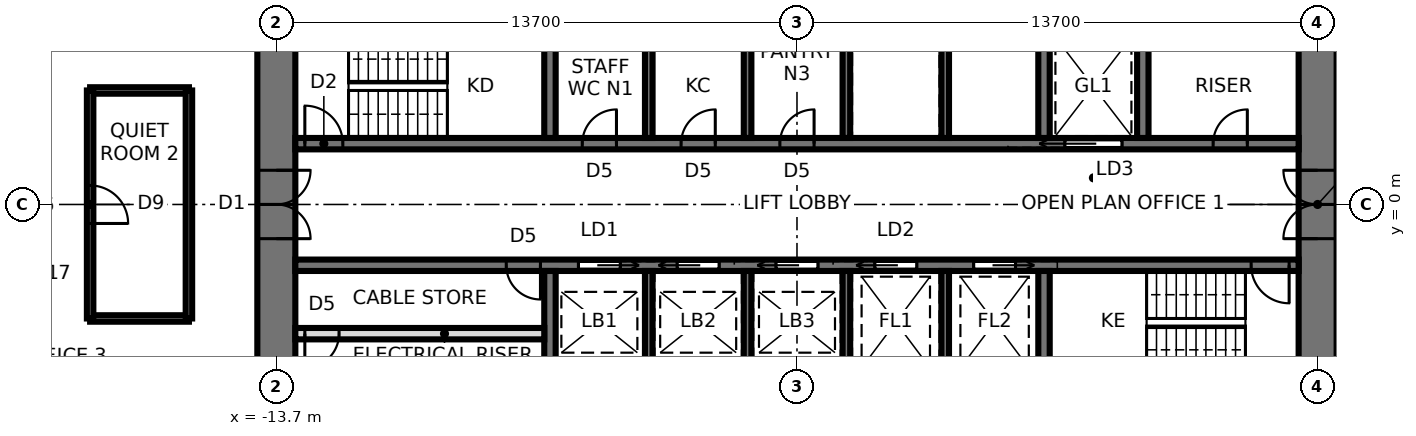
"""IFC4 building model, lengths in metres.
Left out: names, types, materials, properties, quantities, classifications, styles, units other than length and angle.
Written with IfcOpenShell. Run it as: python <this file> out.ifc"""

import sys

from ifc_helpers import new_model, si_unit, direction, frame, frame_2d, origin, place, context, subcontext, project, spatial, rectangle, extrude, element, fill, save


model = new_model("IFC4")
c1 = context("Model", 3, precision=1e-05, world=origin(), true_north=direction((0.0, 1.0)))
c2 = subcontext(c1, "Body", "Model", "MODEL_VIEW")
j1 = project(units=[si_unit("LENGTHUNIT", "METRE"), si_unit("PLANEANGLEUNIT", "RADIAN")], contexts=[c1])
p1 = place(None, origin())
s1 = spatial("IfcSite", under=j1, at=p1, CompositionType="ELEMENT")
p2 = place(p1, origin())
s2 = spatial("IfcBuilding", under=s1, at=p2, CompositionType="ELEMENT")
p3 = place(p2, frame((0.0, 0.0, 127.5)))
s3 = spatial("IfcBuildingStorey", under=s2, at=p3, CompositionType="ELEMENT", Elevation=127.5)
p4 = place(p3, frame((13.7, -9.5, 0.0), z_axis=(0.0, 0.0, 1.0), x_axis=(0.0, 1.0, 0.0)))
e1 = element("IfcWall", 1, at=p4, inside=s3, PredefinedType="SHEAR", context=c2, shape_type="SweptSolid", body=[
    extrude(rectangle(XDim=19.0, YDim=1.0, at=frame_2d((9.5, 0.0))), origin(), (0.0, 0.0, 1.0), 3.9),
])
p5 = place(p4, frame((8.6, 0.0, 0.0)))
e2 = element("IfcOpeningElement", 2, at=p5, cuts=e1, PredefinedType="OPENING", context=c2, shape_type="SweptSolid", body=[
    extrude(rectangle(XDim=1.8, YDim=2.4, at=frame_2d((0.9, 1.2))), frame((0.0, 0.51, 0.0), z_axis=(0.0, -1.0, 0.0), x_axis=(1.0, 0.0, 0.0)), (0.0, 0.0, 1.0), 1.02),
])
p6 = place(p3, frame((-13.7, 9.5, 0.0), z_axis=(0.0, 0.0, 1.0), x_axis=(0.0, -1.0, 0.0)))
e3 = element("IfcWall", 3, at=p6, inside=s3, PredefinedType="SHEAR", context=c2, shape_type="SweptSolid", body=[
    extrude(rectangle(XDim=19.0, YDim=1.0, at=frame_2d((9.5, 0.0))), origin(), (0.0, 0.0, 1.0), 3.9),
])
p7 = place(p6, frame((8.6, 0.0, 0.0)))
e4 = element("IfcOpeningElement", 4, at=p7, cuts=e3, PredefinedType="OPENING", context=c2, shape_type="SweptSolid", body=[
    extrude(rectangle(XDim=1.8, YDim=2.4, at=frame_2d((0.9, 1.2))), frame((0.0, 0.51, 0.0), z_axis=(0.0, -1.0, 0.0), x_axis=(1.0, 0.0, 0.0)), (0.0, 0.0, 1.0), 1.02),
])
p8 = place(p3, frame((-13.2, 1.6, 0.0), z_axis=(0.0, 0.0, 1.0), x_axis=(1.0, 0.0, 0.0)))
e5 = element("IfcWall", 5, at=p8, inside=s3, PredefinedType="SHEAR", context=c2, shape_type="SweptSolid", body=[
    extrude(rectangle(XDim=26.4, YDim=0.3, at=frame_2d((13.2, 0.0))), origin(), (0.0, 0.0, 1.0), 3.9),
])
p9 = place(p8, frame((0.25, 0.0, 0.0)))
e6 = element("IfcOpeningElement", 6, at=p9, cuts=e5, PredefinedType="OPENING", context=c2, shape_type="SweptSolid", body=[
    extrude(rectangle(XDim=1.0, YDim=2.1, at=frame_2d((0.5, 1.05))), frame((0.0, 0.16, 0.0), z_axis=(0.0, -1.0, 0.0), x_axis=(1.0, 0.0, 0.0)), (0.0, 0.0, 1.0), 0.32),
])
p10 = place(p8, frame((20.25, 0.0, 0.0)))
e7 = element("IfcOpeningElement", 7, at=p10, cuts=e5, PredefinedType="OPENING", context=c2, shape_type="SweptSolid", body=[
    extrude(rectangle(XDim=1.5, YDim=2.4, at=frame_2d((0.75, 1.2))), frame((0.0, 0.16, 0.0), z_axis=(0.0, -1.0, 0.0), x_axis=(1.0, 0.0, 0.0)), (0.0, 0.0, 1.0), 0.32),
])
p11 = place(p8, frame((7.55, 0.0, 0.0)))
e8 = element("IfcOpeningElement", 8, at=p11, cuts=e5, PredefinedType="OPENING", context=c2, shape_type="SweptSolid", body=[
    extrude(rectangle(XDim=0.9, YDim=2.1, at=frame_2d((0.45, 1.05))), frame((0.0, 0.16, 0.0), z_axis=(0.0, -1.0, 0.0), x_axis=(1.0, 0.0, 0.0)), (0.0, 0.0, 1.0), 0.32),
])
p12 = place(p8, frame((10.15, 0.0, 0.0)))
e9 = element("IfcOpeningElement", 9, at=p12, cuts=e5, PredefinedType="OPENING", context=c2, shape_type="SweptSolid", body=[
    extrude(rectangle(XDim=0.9, YDim=2.1, at=frame_2d((0.45, 1.05))), frame((0.0, 0.16, 0.0), z_axis=(0.0, -1.0, 0.0), x_axis=(1.0, 0.0, 0.0)), (0.0, 0.0, 1.0), 0.32),
])
p13 = place(p8, frame((12.75, 0.0, 0.0)))
e10 = element("IfcOpeningElement", 10, at=p13, cuts=e5, PredefinedType="OPENING", context=c2, shape_type="SweptSolid", body=[
    extrude(rectangle(XDim=0.9, YDim=2.1, at=frame_2d((0.45, 1.05))), frame((0.0, 0.16, 0.0), z_axis=(0.0, -1.0, 0.0), x_axis=(1.0, 0.0, 0.0)), (0.0, 0.0, 1.0), 0.32),
])
p14 = place(p8, frame((24.15, 0.0, 0.0)))
e11 = element("IfcOpeningElement", 11, at=p14, cuts=e5, PredefinedType="OPENING", context=c2, shape_type="SweptSolid", body=[
    extrude(rectangle(XDim=0.9, YDim=2.1, at=frame_2d((0.45, 1.05))), frame((0.0, 0.16, 0.0), z_axis=(0.0, -1.0, 0.0), x_axis=(1.0, 0.0, 0.0)), (0.0, 0.0, 1.0), 0.32),
])
p15 = place(p3, frame((-13.2, -1.6, 0.0), z_axis=(0.0, 0.0, 1.0), x_axis=(1.0, 0.0, 0.0)))
e12 = element("IfcWall", 12, at=p15, inside=s3, PredefinedType="SHEAR", context=c2, shape_type="SweptSolid", body=[
    extrude(rectangle(XDim=26.4, YDim=0.3, at=frame_2d((13.2, 0.0))), origin(), (0.0, 0.0, 1.0), 3.9),
])
p16 = place(p15, frame((25.15, 0.0, 0.0)))
e13 = element("IfcOpeningElement", 13, at=p16, cuts=e12, PredefinedType="OPENING", context=c2, shape_type="SweptSolid", body=[
    extrude(rectangle(XDim=1.0, YDim=2.1, at=frame_2d((0.5, 1.05))), frame((0.0, 0.16, 0.0), z_axis=(0.0, -1.0, 0.0), x_axis=(1.0, 0.0, 0.0)), (0.0, 0.0, 1.0), 0.32),
])
p17 = place(p15, frame((7.45, 0.0, 0.0)))
e14 = element("IfcOpeningElement", 14, at=p17, cuts=e12, PredefinedType="OPENING", context=c2, shape_type="SweptSolid", body=[
    extrude(rectangle(XDim=1.1, YDim=2.3, at=frame_2d((0.55, 1.15))), frame((0.0, 0.16, 0.0), z_axis=(0.0, -1.0, 0.0), x_axis=(1.0, 0.0, 0.0)), (0.0, 0.0, 1.0), 0.32),
])
p18 = place(p15, frame((10.05, 0.0, 0.0)))
e15 = element("IfcOpeningElement", 15, at=p18, cuts=e12, PredefinedType="OPENING", context=c2, shape_type="SweptSolid", body=[
    extrude(rectangle(XDim=1.1, YDim=2.3, at=frame_2d((0.55, 1.15))), frame((0.0, 0.16, 0.0), z_axis=(0.0, -1.0, 0.0), x_axis=(1.0, 0.0, 0.0)), (0.0, 0.0, 1.0), 0.32),
])
p19 = place(p15, frame((12.65, 0.0, 0.0)))
e16 = element("IfcOpeningElement", 16, at=p19, cuts=e12, PredefinedType="OPENING", context=c2, shape_type="SweptSolid", body=[
    extrude(rectangle(XDim=1.1, YDim=2.3, at=frame_2d((0.55, 1.15))), frame((0.0, 0.16, 0.0), z_axis=(0.0, -1.0, 0.0), x_axis=(1.0, 0.0, 0.0)), (0.0, 0.0, 1.0), 0.32),
])
p20 = place(p15, frame((15.25, 0.0, 0.0)))
e17 = element("IfcOpeningElement", 17, at=p20, cuts=e12, PredefinedType="OPENING", context=c2, shape_type="SweptSolid", body=[
    extrude(rectangle(XDim=1.1, YDim=2.3, at=frame_2d((0.55, 1.15))), frame((0.0, 0.16, 0.0), z_axis=(0.0, -1.0, 0.0), x_axis=(1.0, 0.0, 0.0)), (0.0, 0.0, 1.0), 0.32),
])
p21 = place(p15, frame((17.85, 0.0, 0.0)))
e18 = element("IfcOpeningElement", 18, at=p21, cuts=e12, PredefinedType="OPENING", context=c2, shape_type="SweptSolid", body=[
    extrude(rectangle(XDim=1.1, YDim=2.3, at=frame_2d((0.55, 1.15))), frame((0.0, 0.16, 0.0), z_axis=(0.0, -1.0, 0.0), x_axis=(1.0, 0.0, 0.0)), (0.0, 0.0, 1.0), 0.32),
])
p22 = place(p15, frame((5.55, 0.0, 0.0)))
e19 = element("IfcOpeningElement", 19, at=p22, cuts=e12, PredefinedType="OPENING", context=c2, shape_type="SweptSolid", body=[
    extrude(rectangle(XDim=0.9, YDim=2.1, at=frame_2d((0.45, 1.05))), frame((0.0, 0.16, 0.0), z_axis=(0.0, -1.0, 0.0), x_axis=(1.0, 0.0, 0.0)), (0.0, 0.0, 1.0), 0.32),
])
for number, where, z_axis, x_axis in (
    (20, (-6.5, 1.75, 0.0), (0.0, 0.0, 1.0), (0.0, 1.0, 0.0)),
    (21, (6.5, 1.75, 0.0), (0.0, 0.0, 1.0), (0.0, 1.0, 0.0)),
):
    element("IfcWall", number, at=place(p3, frame(where, z_axis=z_axis, x_axis=x_axis)), inside=s3, PredefinedType="SHEAR", context=c2, shape_type="SweptSolid", body=[
        extrude(rectangle(XDim=2.7, YDim=0.3, at=frame_2d((1.35, 0.0))), origin(), (0.0, 0.0, 1.0), 3.9),
    ])
for number, where, z_axis, x_axis in (
    (22, (-3.9, 1.75, 0.0), (0.0, 0.0, 1.0), (0.0, 1.0, 0.0)),
    (23, (-1.3, 1.75, 0.0), (0.0, 0.0, 1.0), (0.0, 1.0, 0.0)),
    (24, (1.3, 1.75, 0.0), (0.0, 0.0, 1.0), (0.0, 1.0, 0.0)),
    (25, (3.9, 1.75, 0.0), (0.0, 0.0, 1.0), (0.0, 1.0, 0.0)),
):
    element("IfcWall", number, at=place(p3, frame(where, z_axis=z_axis, x_axis=x_axis)), inside=s3, PredefinedType="SHEAR", context=c2, shape_type="SweptSolid", body=[
        extrude(rectangle(XDim=2.7, YDim=0.2, at=frame_2d((1.35, 0.0))), origin(), (0.0, 0.0, 1.0), 3.9),
    ])
for number, where, z_axis, x_axis in (
    (26, (-6.5, -1.75, 0.0), (0.0, 0.0, 1.0), (0.0, -1.0, 0.0)),
    (27, (6.5, -1.75, 0.0), (0.0, 0.0, 1.0), (0.0, -1.0, 0.0)),
):
    element("IfcWall", number, at=place(p3, frame(where, z_axis=z_axis, x_axis=x_axis)), inside=s3, PredefinedType="SHEAR", context=c2, shape_type="SweptSolid", body=[
        extrude(rectangle(XDim=2.7, YDim=0.3, at=frame_2d((1.35, 0.0))), origin(), (0.0, 0.0, 1.0), 3.9),
    ])
for number, where, z_axis, x_axis in (
    (28, (-3.9, -1.75, 0.0), (0.0, 0.0, 1.0), (0.0, -1.0, 0.0)),
    (29, (-1.3, -1.75, 0.0), (0.0, 0.0, 1.0), (0.0, -1.0, 0.0)),
    (30, (1.3, -1.75, 0.0), (0.0, 0.0, 1.0), (0.0, -1.0, 0.0)),
    (31, (3.9, -1.75, 0.0), (0.0, 0.0, 1.0), (0.0, -1.0, 0.0)),
):
    element("IfcWall", number, at=place(p3, frame(where, z_axis=z_axis, x_axis=x_axis)), inside=s3, PredefinedType="SHEAR", context=c2, shape_type="SweptSolid", body=[
        extrude(rectangle(XDim=2.7, YDim=0.2, at=frame_2d((1.35, 0.0))), origin(), (0.0, 0.0, 1.0), 3.9),
    ])
p23 = place(p3, frame((9.1, 1.75, 0.0), z_axis=(0.0, 0.0, 1.0), x_axis=(0.0, 1.0, 0.0)))
e32 = element("IfcWall", 32, at=p23, inside=s3, PredefinedType="SHEAR", context=c2, shape_type="SweptSolid", body=[
    extrude(rectangle(XDim=2.7, YDim=0.3, at=frame_2d((1.35, 0.0))), origin(), (0.0, 0.0, 1.0), 3.9),
])
p24 = place(p3, frame((-13.2, -3.4, 0.0), z_axis=(0.0, 0.0, 1.0), x_axis=(1.0, 0.0, 0.0)))
e33 = element("IfcWall", 33, at=p24, inside=s3, PredefinedType="SOLIDWALL", context=c2, shape_type="SweptSolid", body=[
    extrude(rectangle(XDim=6.55, YDim=0.3, at=frame_2d((3.275, 0.0))), origin(), (0.0, 0.0, 1.0), 3.74),
])
p25 = place(p24, frame((0.25, 0.0, 0.0)))
e34 = element("IfcOpeningElement", 34, at=p25, cuts=e33, PredefinedType="OPENING", context=c2, shape_type="SweptSolid", body=[
    extrude(rectangle(XDim=0.9, YDim=2.1, at=frame_2d((0.45, 1.05))), frame((0.0, 0.16, 0.0), z_axis=(0.0, -1.0, 0.0), x_axis=(1.0, 0.0, 0.0)), (0.0, 0.0, 1.0), 0.32),
])
for number, where, z_axis, x_axis in (
    (35, (-16.0, -3.0, 0.0), (0.0, 0.0, 1.0), (-1.0, 0.0, 0.0)),
    (36, (-18.6, 3.0, 0.0), (0.0, 0.0, 1.0), (1.0, 0.0, 0.0)),
):
    element("IfcWall", number, at=place(p3, frame(where, z_axis=z_axis, x_axis=x_axis)), inside=s3, PredefinedType="PARTITIONING", context=c2, shape_type="SweptSolid", body=[
        extrude(rectangle(XDim=2.6, YDim=0.17, at=frame_2d((1.3, 0.0))), origin(), (0.0, 0.0, 1.0), 3.74),
    ])
p26 = place(p3, frame((-18.6, -3.0, 0.0), z_axis=(0.0, 0.0, 1.0), x_axis=(0.0, 1.0, 0.0)))
e37 = element("IfcWall", 37, at=p26, inside=s3, PredefinedType="PARTITIONING", context=c2, shape_type="SweptSolid", body=[
    extrude(rectangle(XDim=6.0, YDim=0.17, at=frame_2d((3.0, 0.0))), origin(), (0.0, 0.0, 1.0), 3.74),
])
p27 = place(p26, frame((2.5, 0.0, 0.0)))
e38 = element("IfcOpeningElement", 38, at=p27, cuts=e37, PredefinedType="OPENING", context=c2, shape_type="SweptSolid", body=[
    extrude(rectangle(XDim=1.0, YDim=2.4, at=frame_2d((0.5, 1.2))), frame((0.0, 0.095, 0.0), z_axis=(0.0, -1.0, 0.0), x_axis=(1.0, 0.0, 0.0)), (0.0, 0.0, 1.0), 0.19),
])
p28 = place(p3, frame((-16.0, 3.0, 0.0), z_axis=(0.0, 0.0, 1.0), x_axis=(0.0, -1.0, 0.0)))
e39 = element("IfcWall", 39, at=p28, inside=s3, PredefinedType="PARTITIONING", context=c2, shape_type="SweptSolid", body=[
    extrude(rectangle(XDim=6.0, YDim=0.17, at=frame_2d((3.0, 0.0))), origin(), (0.0, 0.0, 1.0), 3.74),
])
p29 = place(p7, origin())
e40 = element("IfcDoor", 40, at=p29, inside=s3, OperationType="DOUBLE_DOOR_SINGLE_SWING", PredefinedType="DOOR", context=c2, shape_type="SweptSolid", body=[
    extrude(rectangle(XDim=1.72, YDim=2.36, at=frame_2d((0.9, 1.18))), frame((0.0, 0.025, 0.0), z_axis=(0.0, -1.0, 0.0), x_axis=(1.0, 0.0, 0.0)), (0.0, 0.0, 1.0), 0.05),
    extrude(rectangle(XDim=0.04, YDim=2.4, at=frame_2d((0.02, 1.2))), frame((0.0, 0.25, 0.0), z_axis=(0.0, -1.0, 0.0), x_axis=(1.0, 0.0, 0.0)), (0.0, 0.0, 1.0), 0.5),
    extrude(rectangle(XDim=0.04, YDim=2.4, at=frame_2d((1.78, 1.2))), frame((0.0, 0.25, 0.0), z_axis=(0.0, -1.0, 0.0), x_axis=(1.0, 0.0, 0.0)), (0.0, 0.0, 1.0), 0.5),
    extrude(rectangle(XDim=1.72, YDim=0.04, at=frame_2d((0.9, 2.38))), frame((0.0, 0.25, 0.0), z_axis=(0.0, -1.0, 0.0), x_axis=(1.0, 0.0, 0.0)), (0.0, 0.0, 1.0), 0.5),
])
fill(e4, e40)
p30 = place(p5, origin())
e41 = element("IfcDoor", 41, at=p30, inside=s3, OperationType="DOUBLE_DOOR_SINGLE_SWING", PredefinedType="DOOR", context=c2, shape_type="SweptSolid", body=[
    extrude(rectangle(XDim=1.72, YDim=2.36, at=frame_2d((0.9, 1.18))), frame((0.0, 0.025, 0.0), z_axis=(0.0, -1.0, 0.0), x_axis=(1.0, 0.0, 0.0)), (0.0, 0.0, 1.0), 0.05),
    extrude(rectangle(XDim=0.04, YDim=2.4, at=frame_2d((0.02, 1.2))), frame((0.0, 0.25, 0.0), z_axis=(0.0, -1.0, 0.0), x_axis=(1.0, 0.0, 0.0)), (0.0, 0.0, 1.0), 0.5),
    extrude(rectangle(XDim=0.04, YDim=2.4, at=frame_2d((1.78, 1.2))), frame((0.0, 0.25, 0.0), z_axis=(0.0, -1.0, 0.0), x_axis=(1.0, 0.0, 0.0)), (0.0, 0.0, 1.0), 0.5),
    extrude(rectangle(XDim=1.72, YDim=0.04, at=frame_2d((0.9, 2.38))), frame((0.0, 0.25, 0.0), z_axis=(0.0, -1.0, 0.0), x_axis=(1.0, 0.0, 0.0)), (0.0, 0.0, 1.0), 0.5),
])
fill(e2, e41)
p31 = place(p9, origin())
e42 = element("IfcDoor", 42, at=p31, inside=s3, OperationType="SINGLE_SWING_LEFT", PredefinedType="DOOR", context=c2, shape_type="SweptSolid", body=[
    extrude(rectangle(XDim=1.0, YDim=2.1, at=frame_2d((0.5, 1.05))), frame((0.0, 0.025, 0.0), z_axis=(0.0, -1.0, 0.0), x_axis=(1.0, 0.0, 0.0)), (0.0, 0.0, 1.0), 0.05),
])
fill(e6, e42)
p32 = place(p16, frame((1.0, 0.0, 0.0), z_axis=(0.0, 0.0, 1.0), x_axis=(-1.0, 0.0, 0.0)))
e43 = element("IfcDoor", 43, at=p32, inside=s3, OperationType="SINGLE_SWING_LEFT", PredefinedType="DOOR", context=c2, shape_type="SweptSolid", body=[
    extrude(rectangle(XDim=1.0, YDim=2.1, at=frame_2d((0.5, 1.05))), frame((0.0, 0.025, 0.0), z_axis=(0.0, -1.0, 0.0), x_axis=(1.0, 0.0, 0.0)), (0.0, 0.0, 1.0), 0.05),
])
fill(e13, e43)
p33 = place(p10, origin())
e44 = element("IfcDoor", 44, at=p33, inside=s3, OperationType="SLIDING_TO_LEFT", PredefinedType="DOOR", context=c2, shape_type="SweptSolid", body=[
    extrude(rectangle(XDim=1.5, YDim=2.4, at=frame_2d((0.75, 1.2))), frame((0.0, 0.025, 0.0), z_axis=(0.0, -1.0, 0.0), x_axis=(1.0, 0.0, 0.0)), (0.0, 0.0, 1.0), 0.05),
])
fill(e7, e44)
p34 = place(p11, origin())
e45 = element("IfcDoor", 45, at=p34, inside=s3, OperationType="SINGLE_SWING_RIGHT", PredefinedType="DOOR", context=c2, shape_type="SweptSolid", body=[
    extrude(rectangle(XDim=0.9, YDim=2.1, at=frame_2d((0.45, 1.05))), frame((0.0, 0.025, 0.0), z_axis=(0.0, -1.0, 0.0), x_axis=(1.0, 0.0, 0.0)), (0.0, 0.0, 1.0), 0.05),
])
fill(e8, e45)
p35 = place(p12, origin())
e46 = element("IfcDoor", 46, at=p35, inside=s3, OperationType="SINGLE_SWING_RIGHT", PredefinedType="DOOR", context=c2, shape_type="SweptSolid", body=[
    extrude(rectangle(XDim=0.9, YDim=2.1, at=frame_2d((0.45, 1.05))), frame((0.0, 0.025, 0.0), z_axis=(0.0, -1.0, 0.0), x_axis=(1.0, 0.0, 0.0)), (0.0, 0.0, 1.0), 0.05),
])
fill(e9, e46)
p36 = place(p13, origin())
e47 = element("IfcDoor", 47, at=p36, inside=s3, OperationType="SINGLE_SWING_RIGHT", PredefinedType="DOOR", context=c2, shape_type="SweptSolid", body=[
    extrude(rectangle(XDim=0.9, YDim=2.1, at=frame_2d((0.45, 1.05))), frame((0.0, 0.025, 0.0), z_axis=(0.0, -1.0, 0.0), x_axis=(1.0, 0.0, 0.0)), (0.0, 0.0, 1.0), 0.05),
])
fill(e10, e47)
p37 = place(p17, frame((1.1, 0.0, 0.0), z_axis=(0.0, 0.0, 1.0), x_axis=(-1.0, 0.0, 0.0)))
e48 = element("IfcDoor", 48, at=p37, inside=s3, OperationType="SLIDING_TO_LEFT", PredefinedType="DOOR", context=c2, shape_type="SweptSolid", body=[
    extrude(rectangle(XDim=1.1, YDim=2.3, at=frame_2d((0.55, 1.15))), frame((0.0, 0.025, 0.0), z_axis=(0.0, -1.0, 0.0), x_axis=(1.0, 0.0, 0.0)), (0.0, 0.0, 1.0), 0.05),
])
fill(e14, e48)
p38 = place(p18, frame((1.1, 0.0, 0.0), z_axis=(0.0, 0.0, 1.0), x_axis=(-1.0, 0.0, 0.0)))
e49 = element("IfcDoor", 49, at=p38, inside=s3, OperationType="SLIDING_TO_RIGHT", PredefinedType="DOOR", context=c2, shape_type="SweptSolid", body=[
    extrude(rectangle(XDim=1.1, YDim=2.3, at=frame_2d((0.55, 1.15))), frame((0.0, 0.025, 0.0), z_axis=(0.0, -1.0, 0.0), x_axis=(1.0, 0.0, 0.0)), (0.0, 0.0, 1.0), 0.05),
])
fill(e15, e49)
p39 = place(p19, frame((1.1, 0.0, 0.0), z_axis=(0.0, 0.0, 1.0), x_axis=(-1.0, 0.0, 0.0)))
e50 = element("IfcDoor", 50, at=p39, inside=s3, OperationType="SLIDING_TO_RIGHT", PredefinedType="DOOR", context=c2, shape_type="SweptSolid", body=[
    extrude(rectangle(XDim=1.1, YDim=2.3, at=frame_2d((0.55, 1.15))), frame((0.0, 0.025, 0.0), z_axis=(0.0, -1.0, 0.0), x_axis=(1.0, 0.0, 0.0)), (0.0, 0.0, 1.0), 0.05),
])
fill(e16, e50)
p40 = place(p20, frame((1.1, 0.0, 0.0), z_axis=(0.0, 0.0, 1.0), x_axis=(-1.0, 0.0, 0.0)))
e51 = element("IfcDoor", 51, at=p40, inside=s3, OperationType="SLIDING_TO_RIGHT", PredefinedType="DOOR", context=c2, shape_type="SweptSolid", body=[
    extrude(rectangle(XDim=1.1, YDim=2.3, at=frame_2d((0.55, 1.15))), frame((0.0, 0.025, 0.0), z_axis=(0.0, -1.0, 0.0), x_axis=(1.0, 0.0, 0.0)), (0.0, 0.0, 1.0), 0.05),
])
fill(e17, e51)
p41 = place(p21, frame((1.1, 0.0, 0.0), z_axis=(0.0, 0.0, 1.0), x_axis=(-1.0, 0.0, 0.0)))
e52 = element("IfcDoor", 52, at=p41, inside=s3, OperationType="SLIDING_TO_LEFT", PredefinedType="DOOR", context=c2, shape_type="SweptSolid", body=[
    extrude(rectangle(XDim=1.1, YDim=2.3, at=frame_2d((0.55, 1.15))), frame((0.0, 0.025, 0.0), z_axis=(0.0, -1.0, 0.0), x_axis=(1.0, 0.0, 0.0)), (0.0, 0.0, 1.0), 0.05),
])
fill(e18, e52)
p42 = place(p14, origin())
e53 = element("IfcDoor", 53, at=p42, inside=s3, OperationType="SINGLE_SWING_RIGHT", PredefinedType="DOOR", context=c2, shape_type="SweptSolid", body=[
    extrude(rectangle(XDim=0.9, YDim=2.1, at=frame_2d((0.45, 1.05))), frame((0.0, 0.025, 0.0), z_axis=(0.0, -1.0, 0.0), x_axis=(1.0, 0.0, 0.0)), (0.0, 0.0, 1.0), 0.05),
])
fill(e11, e53)
p43 = place(p22, frame((0.9, 0.0, 0.0), z_axis=(0.0, 0.0, 1.0), x_axis=(-1.0, 0.0, 0.0)))
e54 = element("IfcDoor", 54, at=p43, inside=s3, OperationType="SINGLE_SWING_LEFT", PredefinedType="DOOR", context=c2, shape_type="SweptSolid", body=[
    extrude(rectangle(XDim=0.9, YDim=2.1, at=frame_2d((0.45, 1.05))), frame((0.0, 0.025, 0.0), z_axis=(0.0, -1.0, 0.0), x_axis=(1.0, 0.0, 0.0)), (0.0, 0.0, 1.0), 0.05),
])
fill(e19, e54)
p44 = place(p25, frame((0.9, 0.0, 0.0), z_axis=(0.0, 0.0, 1.0), x_axis=(-1.0, 0.0, 0.0)))
e55 = element("IfcDoor", 55, at=p44, inside=s3, OperationType="SINGLE_SWING_RIGHT", PredefinedType="DOOR", context=c2, shape_type="SweptSolid", body=[
    extrude(rectangle(XDim=0.9, YDim=2.1, at=frame_2d((0.45, 1.05))), frame((0.0, 0.025, 0.0), z_axis=(0.0, -1.0, 0.0), x_axis=(1.0, 0.0, 0.0)), (0.0, 0.0, 1.0), 0.05),
])
fill(e34, e55)
p45 = place(p27, frame((1.0, 0.0, 0.0), z_axis=(0.0, 0.0, 1.0), x_axis=(-1.0, 0.0, 0.0)))
e56 = element("IfcDoor", 56, at=p45, inside=s3, OperationType="SINGLE_SWING_RIGHT", PredefinedType="DOOR", context=c2, shape_type="SweptSolid", body=[
    extrude(rectangle(XDim=1.0, YDim=2.4, at=frame_2d((0.5, 1.2))), frame((0.0, 0.025, 0.0), z_axis=(0.0, -1.0, 0.0), x_axis=(1.0, 0.0, 0.0)), (0.0, 0.0, 1.0), 0.05),
])
fill(e38, e56)
save(model, sys.argv[1])
